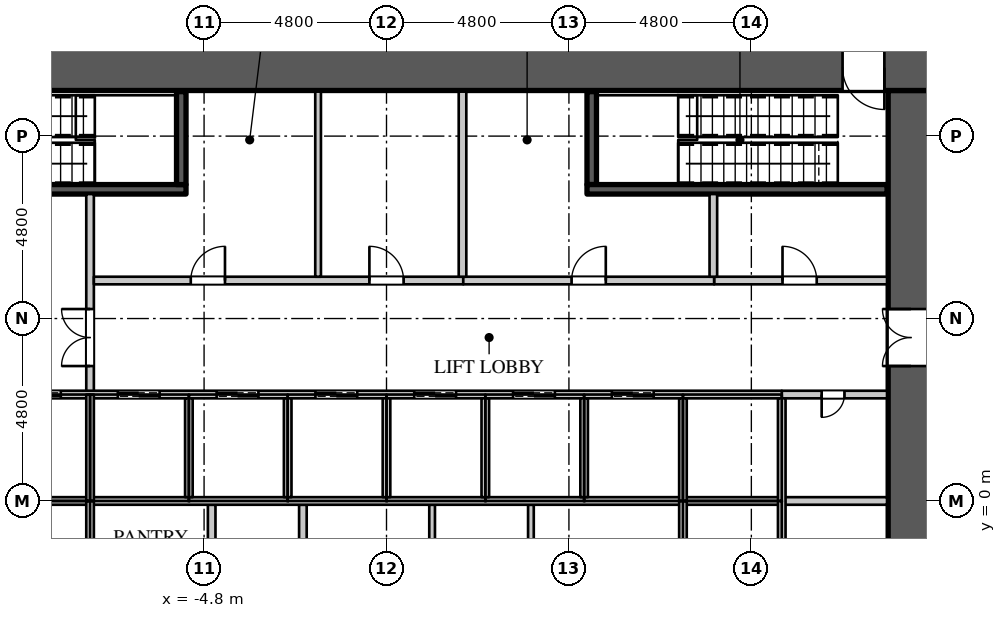
"""IFC4 building model, lengths in metres.
Left out: names, types, materials, properties, quantities, classifications, styles, units other than length and angle.
Written with IfcOpenShell. Run it as: python <this file> out.ifc"""

import sys

from ifc_helpers import new_model, si_unit, direction, frame, frame_2d, origin, place, context, subcontext, project, spatial, rectangle, extrude, element, fill, save


model = new_model("IFC4")
c1 = context("Model", 3, precision=1e-05, world=origin(), true_north=direction((0.0, 1.0)))
c2 = subcontext(c1, "Body", "Model", "MODEL_VIEW")
j1 = project(units=[si_unit("LENGTHUNIT", "METRE"), si_unit("PLANEANGLEUNIT", "RADIAN")], contexts=[c1])
p1 = place(None, origin())
s1 = spatial("IfcSite", under=j1, at=p1, CompositionType="ELEMENT")
p2 = place(p1, origin())
s2 = spatial("IfcBuilding", under=s1, at=p2, CompositionType="ELEMENT")
p3 = place(p2, frame((0.0, 0.0, 6.0)))
s3 = spatial("IfcBuildingStorey", under=s2, at=p3, CompositionType="ELEMENT", Elevation=6.0)
p4 = place(p3, frame((-14.4, 11.4, 0.0), z_axis=(0.0, 0.0, 1.0), x_axis=(1.0, 0.0, 0.0)))
e1 = element("IfcWall", 1, at=p4, inside=s3, PredefinedType="SHEAR", context=c2, shape_type="SweptSolid", body=[
    extrude(rectangle(XDim=28.8, YDim=1.2, at=frame_2d((14.4, 0.0))), origin(), (0.0, 0.0, 1.0), 5.0),
])
p5 = place(p4, frame((1.3, 0.0, 0.0)))
e2 = element("IfcOpeningElement", 2, at=p5, cuts=e1, PredefinedType="OPENING", context=c2, shape_type="SweptSolid", body=[
    extrude(rectangle(XDim=1.1, YDim=2.2, at=frame_2d((0.55, 1.1))), frame((0.0, 0.61, 0.0), z_axis=(0.0, -1.0, 0.0), x_axis=(1.0, 0.0, 0.0)), (0.0, 0.0, 1.0), 1.22),
])
p6 = place(p4, frame((26.4, 0.0, 0.0)))
e3 = element("IfcOpeningElement", 3, at=p6, cuts=e1, PredefinedType="OPENING", context=c2, shape_type="SweptSolid", body=[
    extrude(rectangle(XDim=1.1, YDim=2.2, at=frame_2d((0.55, 1.1))), frame((0.0, 0.61, 0.0), z_axis=(0.0, -1.0, 0.0), x_axis=(1.0, 0.0, 0.0)), (0.0, 0.0, 1.0), 1.22),
])
p7 = place(p3, frame((13.8, -10.8, 0.0), z_axis=(0.0, 0.0, 1.0), x_axis=(0.0, 1.0, 0.0)))
e4 = element("IfcWall", 4, at=p7, inside=s3, PredefinedType="SHEAR", context=c2, shape_type="SweptSolid", body=[
    extrude(rectangle(XDim=21.6, YDim=1.2, at=frame_2d((10.8, 0.0))), origin(), (0.0, 0.0, 1.0), 5.0),
])
p8 = place(p7, frame((14.35, 0.0, 0.0)))
e5 = element("IfcOpeningElement", 5, at=p8, cuts=e4, PredefinedType="OPENING", context=c2, shape_type="SweptSolid", body=[
    extrude(rectangle(XDim=1.5, YDim=2.4, at=frame_2d((0.75, 1.2))), frame((0.0, 0.61, 0.0), z_axis=(0.0, -1.0, 0.0), x_axis=(1.0, 0.0, 0.0)), (0.0, 0.0, 1.0), 1.22),
])
p9 = place(p7, frame((5.75, 0.0, 0.0)))
e6 = element("IfcOpeningElement", 6, at=p9, cuts=e4, PredefinedType="OPENING", context=c2, shape_type="SweptSolid", body=[
    extrude(rectangle(XDim=1.5, YDim=2.4, at=frame_2d((0.75, 1.2))), frame((0.0, 0.61, 0.0), z_axis=(0.0, -1.0, 0.0), x_axis=(1.0, 0.0, 0.0)), (0.0, 0.0, 1.0), 1.22),
])
p10 = place(p3, frame((-7.8, 2.8, 0.0), z_axis=(0.0, 0.0, 1.0), x_axis=(0.0, 1.0, 0.0)))
e7 = element("IfcWall", 7, at=p10, inside=s3, PredefinedType="PARTITIONING", context=c2, shape_type="SweptSolid", body=[
    extrude(rectangle(XDim=5.275, YDim=0.2, at=frame_2d((2.637, 0.0))), origin(), (0.0, 0.0, 1.0), 4.4),
])
p11 = place(p10, frame((0.75, 0.0, 0.0)))
e8 = element("IfcOpeningElement", 8, at=p11, cuts=e7, PredefinedType="OPENING", context=c2, shape_type="SweptSolid", body=[
    extrude(rectangle(XDim=1.5, YDim=2.4, at=frame_2d((0.75, 1.2))), frame((0.0, 0.11, 0.0), z_axis=(0.0, -1.0, 0.0), x_axis=(1.0, 0.0, 0.0)), (0.0, 0.0, 1.0), 0.22),
])
p12 = place(p3, frame((-7.7, 5.8, 0.0), z_axis=(0.0, 0.0, 1.0), x_axis=(1.0, 0.0, 0.0)))
e9 = element("IfcWall", 9, at=p12, inside=s3, PredefinedType="PARTITIONING", context=c2, shape_type="SweptSolid", body=[
    extrude(rectangle(XDim=9.72, YDim=0.2, at=frame_2d((4.86, 0.0))), origin(), (0.0, 0.0, 1.0), 4.4),
])
p13 = place(p12, frame((2.55, 0.0, 0.0)))
e10 = element("IfcOpeningElement", 10, at=p13, cuts=e9, PredefinedType="OPENING", context=c2, shape_type="SweptSolid", body=[
    extrude(rectangle(XDim=0.9, YDim=2.2, at=frame_2d((0.45, 1.1))), frame((0.0, 0.11, 0.0), z_axis=(0.0, -1.0, 0.0), x_axis=(1.0, 0.0, 0.0)), (0.0, 0.0, 1.0), 0.22),
])
p14 = place(p12, frame((7.25, 0.0, 0.0)))
e11 = element("IfcOpeningElement", 11, at=p14, cuts=e9, PredefinedType="OPENING", context=c2, shape_type="SweptSolid", body=[
    extrude(rectangle(XDim=0.9, YDim=2.2, at=frame_2d((0.45, 1.1))), frame((0.0, 0.11, 0.0), z_axis=(0.0, -1.0, 0.0), x_axis=(1.0, 0.0, 0.0)), (0.0, 0.0, 1.0), 0.22),
])
p15 = place(p3, frame((8.62, 5.8, 0.0), z_axis=(0.0, 0.0, 1.0), x_axis=(1.0, 0.0, 0.0)))
e12 = element("IfcWall", 12, at=p15, inside=s3, PredefinedType="PARTITIONING", context=c2, shape_type="SweptSolid", body=[
    extrude(rectangle(XDim=4.55, YDim=0.2, at=frame_2d((2.275, 0.0))), origin(), (0.0, 0.0, 1.0), 4.4),
])
p16 = place(p15, frame((1.8, 0.0, 0.0)))
e13 = element("IfcOpeningElement", 13, at=p16, cuts=e12, PredefinedType="OPENING", context=c2, shape_type="SweptSolid", body=[
    extrude(rectangle(XDim=0.9, YDim=2.2, at=frame_2d((0.45, 1.1))), frame((0.0, 0.11, 0.0), z_axis=(0.0, -1.0, 0.0), x_axis=(1.0, 0.0, 0.0)), (0.0, 0.0, 1.0), 0.22),
])
p17 = place(p3, frame((-1.8, 5.9, 0.0), z_axis=(0.0, 0.0, 1.0), x_axis=(0.0, 1.0, 0.0)))
e14 = element("IfcWall", 14, at=p17, inside=s3, PredefinedType="PARTITIONING", context=c2, shape_type="SweptSolid", body=[
    extrude(rectangle(XDim=4.87, YDim=0.15, at=frame_2d((2.435, 0.0))), origin(), (0.0, 0.0, 1.0), 4.4),
])
for number, where, z_axis, x_axis in (
    (15, (1.2, -2.7, 0.0), (0.0, 0.0, 1.0), (0.0, 1.0, 0.0)),
    (16, (3.8, -2.7, 0.0), (0.0, 0.0, 1.0), (0.0, 1.0, 0.0)),
):
    element("IfcWall", number, at=place(p3, frame(where, z_axis=z_axis, x_axis=x_axis)), inside=s3, PredefinedType="PARTITIONING", context=c2, shape_type="SweptSolid", body=[
        extrude(rectangle(XDim=2.6, YDim=0.15, at=frame_2d((1.3, 0.0))), origin(), (0.0, 0.0, 1.0), 4.4),
    ])
for number, where, z_axis, x_axis in (
    (17, (-4.6, -2.7, 0.0), (0.0, 0.0, 1.0), (0.0, 1.0, 0.0)),
    (18, (-2.2, -2.7, 0.0), (0.0, 0.0, 1.0), (0.0, 1.0, 0.0)),
):
    element("IfcWall", number, at=place(p3, frame(where, z_axis=z_axis, x_axis=x_axis)), inside=s3, PredefinedType="PARTITIONING", context=c2, shape_type="SweptSolid", body=[
        extrude(rectangle(XDim=2.6, YDim=0.2, at=frame_2d((1.3, 0.0))), origin(), (0.0, 0.0, 1.0), 4.4),
    ])
p18 = place(p3, frame((2.02, 5.8, 0.0), z_axis=(0.0, 0.0, 1.0), x_axis=(1.0, 0.0, 0.0)))
e19 = element("IfcWall", 19, at=p18, inside=s3, PredefinedType="PARTITIONING", context=c2, shape_type="SweptSolid", body=[
    extrude(rectangle(XDim=6.6, YDim=0.2, at=frame_2d((3.3, 0.0))), origin(), (0.0, 0.0, 1.0), 4.4),
])
p19 = place(p18, frame((2.85, 0.0, 0.0)))
e20 = element("IfcOpeningElement", 20, at=p19, cuts=e19, PredefinedType="OPENING", context=c2, shape_type="SweptSolid", body=[
    extrude(rectangle(XDim=0.9, YDim=2.2, at=frame_2d((0.45, 1.1))), frame((0.0, 0.11, 0.0), z_axis=(0.0, -1.0, 0.0), x_axis=(1.0, 0.0, 0.0)), (0.0, 0.0, 1.0), 0.22),
])
p20 = place(p3, frame((2.0, 5.9, 0.0), z_axis=(0.0, 0.0, 1.0), x_axis=(0.0, 1.0, 0.0)))
e21 = element("IfcWall", 21, at=p20, inside=s3, PredefinedType="PARTITIONING", context=c2, shape_type="SweptSolid", body=[
    extrude(rectangle(XDim=4.87, YDim=0.2, at=frame_2d((2.435, 0.0))), origin(), (0.0, 0.0, 1.0), 4.4),
])
p21 = place(p3, frame((8.6, 5.9, 0.0), z_axis=(0.0, 0.0, 1.0), x_axis=(0.0, 1.0, 0.0)))
e22 = element("IfcWall", 22, at=p21, inside=s3, PredefinedType="PARTITIONING", context=c2, shape_type="SweptSolid", body=[
    extrude(rectangle(XDim=2.175, YDim=0.2, at=frame_2d((1.087, 0.0))), origin(), (0.0, 0.0, 1.0), 4.4),
])
p22 = place(p3, frame((10.4, 2.8, 0.0), z_axis=(0.0, 0.0, 1.0), x_axis=(1.0, 0.0, 0.0)))
e23 = element("IfcWall", 23, at=p22, inside=s3, PredefinedType="PARTITIONING", context=c2, shape_type="SweptSolid", body=[
    extrude(rectangle(XDim=2.77, YDim=0.2, at=frame_2d((1.385, 0.0))), origin(), (0.0, 0.0, 1.0), 4.4),
])
p23 = place(p22, frame((1.05, 0.0, 0.0)))
e24 = element("IfcOpeningElement", 24, at=p23, cuts=e23, PredefinedType="OPENING", context=c2, shape_type="SweptSolid", body=[
    extrude(rectangle(XDim=0.6, YDim=2.0, at=frame_2d((0.3, 1.0))), frame((0.0, 0.11, 0.0), z_axis=(0.0, -1.0, 0.0), x_axis=(1.0, 0.0, 0.0)), (0.0, 0.0, 1.0), 0.22),
])
p24 = place(p3, frame((10.4, 0.0, 0.0), z_axis=(0.0, 0.0, 1.0), x_axis=(1.0, 0.0, 0.0)))
e25 = element("IfcWall", 25, at=p24, inside=s3, PredefinedType="PARTITIONING", context=c2, shape_type="SweptSolid", body=[
    extrude(rectangle(XDim=2.77, YDim=0.2, at=frame_2d((1.385, 0.0))), origin(), (0.0, 0.0, 1.0), 4.4),
])
p25 = place(p3, frame((-13.17, 0.0, 0.0), z_axis=(0.0, 0.0, 1.0), x_axis=(1.0, 0.0, 0.0)))
e26 = element("IfcWall", 26, at=p25, inside=s3, PredefinedType="PARTITIONING", context=c2, shape_type="SweptSolid", body=[
    extrude(rectangle(XDim=23.57, YDim=0.2, at=frame_2d((11.785, 0.0))), origin(), (0.0, 0.0, 1.0), 4.4),
])
p26 = place(p3, frame((-13.17, 2.8, 0.0), z_axis=(0.0, 0.0, 1.0), x_axis=(1.0, 0.0, 0.0)))
e27 = element("IfcWall", 27, at=p26, inside=s3, PredefinedType="PARTITIONING", context=c2, shape_type="SweptSolid", body=[
    extrude(rectangle(XDim=23.57, YDim=0.2, at=frame_2d((11.785, 0.0))), origin(), (0.0, 0.0, 1.0), 4.4),
])
p27 = place(p26, frame((0.8, 0.0, 0.0)))
e28 = element("IfcOpeningElement", 28, at=p27, cuts=e27, PredefinedType="OPENING", context=c2, shape_type="SweptSolid", body=[
    extrude(rectangle(XDim=1.1, YDim=2.2, at=frame_2d((0.55, 1.1))), frame((0.0, 0.11, 0.0), z_axis=(0.0, -1.0, 0.0), x_axis=(1.0, 0.0, 0.0)), (0.0, 0.0, 1.0), 0.22),
])
p28 = place(p26, frame((3.5, 0.0, 0.0)))
e29 = element("IfcOpeningElement", 29, at=p28, cuts=e27, PredefinedType="OPENING", context=c2, shape_type="SweptSolid", body=[
    extrude(rectangle(XDim=1.1, YDim=2.2, at=frame_2d((0.55, 1.1))), frame((0.0, 0.11, 0.0), z_axis=(0.0, -1.0, 0.0), x_axis=(1.0, 0.0, 0.0)), (0.0, 0.0, 1.0), 0.22),
])
p29 = place(p26, frame((6.1, 0.0, 0.0)))
e30 = element("IfcOpeningElement", 30, at=p29, cuts=e27, PredefinedType="OPENING", context=c2, shape_type="SweptSolid", body=[
    extrude(rectangle(XDim=1.1, YDim=2.2, at=frame_2d((0.55, 1.1))), frame((0.0, 0.11, 0.0), z_axis=(0.0, -1.0, 0.0), x_axis=(1.0, 0.0, 0.0)), (0.0, 0.0, 1.0), 0.22),
])
p30 = place(p26, frame((8.7, 0.0, 0.0)))
e31 = element("IfcOpeningElement", 31, at=p30, cuts=e27, PredefinedType="OPENING", context=c2, shape_type="SweptSolid", body=[
    extrude(rectangle(XDim=1.1, YDim=2.2, at=frame_2d((0.55, 1.1))), frame((0.0, 0.11, 0.0), z_axis=(0.0, -1.0, 0.0), x_axis=(1.0, 0.0, 0.0)), (0.0, 0.0, 1.0), 0.22),
])
p31 = place(p26, frame((11.3, 0.0, 0.0)))
e32 = element("IfcOpeningElement", 32, at=p31, cuts=e27, PredefinedType="OPENING", context=c2, shape_type="SweptSolid", body=[
    extrude(rectangle(XDim=1.1, YDim=2.2, at=frame_2d((0.55, 1.1))), frame((0.0, 0.11, 0.0), z_axis=(0.0, -1.0, 0.0), x_axis=(1.0, 0.0, 0.0)), (0.0, 0.0, 1.0), 0.22),
])
p32 = place(p26, frame((13.9, 0.0, 0.0)))
e33 = element("IfcOpeningElement", 33, at=p32, cuts=e27, PredefinedType="OPENING", context=c2, shape_type="SweptSolid", body=[
    extrude(rectangle(XDim=1.1, YDim=2.2, at=frame_2d((0.55, 1.1))), frame((0.0, 0.11, 0.0), z_axis=(0.0, -1.0, 0.0), x_axis=(1.0, 0.0, 0.0)), (0.0, 0.0, 1.0), 0.22),
])
p33 = place(p26, frame((16.5, 0.0, 0.0)))
e34 = element("IfcOpeningElement", 34, at=p33, cuts=e27, PredefinedType="OPENING", context=c2, shape_type="SweptSolid", body=[
    extrude(rectangle(XDim=1.1, YDim=2.2, at=frame_2d((0.55, 1.1))), frame((0.0, 0.11, 0.0), z_axis=(0.0, -1.0, 0.0), x_axis=(1.0, 0.0, 0.0)), (0.0, 0.0, 1.0), 0.22),
])
p34 = place(p26, frame((19.1, 0.0, 0.0)))
e35 = element("IfcOpeningElement", 35, at=p34, cuts=e27, PredefinedType="OPENING", context=c2, shape_type="SweptSolid", body=[
    extrude(rectangle(XDim=1.1, YDim=2.2, at=frame_2d((0.55, 1.1))), frame((0.0, 0.11, 0.0), z_axis=(0.0, -1.0, 0.0), x_axis=(1.0, 0.0, 0.0)), (0.0, 0.0, 1.0), 0.22),
])
for number, where, z_axis, x_axis in (
    (36, (-7.8, -2.8, 0.0), (0.0, 0.0, 1.0), (0.0, 1.0, 0.0)),
    (37, (-7.8, 0.0, 0.0), (0.0, 0.0, 1.0), (0.0, 1.0, 0.0)),
):
    element("IfcWall", number, at=place(p3, frame(where, z_axis=z_axis, x_axis=x_axis)), inside=s3, PredefinedType="PARTITIONING", context=c2, shape_type="SweptSolid", body=[
        extrude(rectangle(XDim=2.8, YDim=0.2, at=frame_2d((1.4, 0.0))), origin(), (0.0, 0.0, 1.0), 4.4),
    ])
for number, where, z_axis, x_axis in (
    (38, (-5.2, 0.1, 0.0), (0.0, 0.0, 1.0), (0.0, 1.0, 0.0)),
    (39, (-2.6, 0.1, 0.0), (0.0, 0.0, 1.0), (0.0, 1.0, 0.0)),
    (40, (0.0, 0.1, 0.0), (0.0, 0.0, 1.0), (0.0, 1.0, 0.0)),
    (41, (2.6, 0.1, 0.0), (0.0, 0.0, 1.0), (0.0, 1.0, 0.0)),
    (42, (5.2, 0.1, 0.0), (0.0, 0.0, 1.0), (0.0, 1.0, 0.0)),
):
    element("IfcWall", number, at=place(p3, frame(where, z_axis=z_axis, x_axis=x_axis)), inside=s3, PredefinedType="PARTITIONING", context=c2, shape_type="SweptSolid", body=[
        extrude(rectangle(XDim=2.6, YDim=0.2, at=frame_2d((1.3, 0.0))), origin(), (0.0, 0.0, 1.0), 4.4),
    ])
for number, where, z_axis, x_axis in (
    (43, (7.8, -2.7, 0.0), (0.0, 0.0, 1.0), (0.0, 1.0, 0.0)),
    (44, (7.8, 0.0, 0.0), (0.0, 0.0, 1.0), (0.0, 1.0, 0.0)),
):
    element("IfcWall", number, at=place(p3, frame(where, z_axis=z_axis, x_axis=x_axis)), inside=s3, PredefinedType="PARTITIONING", context=c2, shape_type="SweptSolid", body=[
        extrude(rectangle(XDim=2.7, YDim=0.2, at=frame_2d((1.35, 0.0))), origin(), (0.0, 0.0, 1.0), 4.4),
    ])
p35 = place(p3, frame((10.4, -2.7, 0.0), z_axis=(0.0, 0.0, 1.0), x_axis=(0.0, 1.0, 0.0)))
e45 = element("IfcWall", 45, at=p35, inside=s3, PredefinedType="PARTITIONING", context=c2, shape_type="SweptSolid", body=[
    extrude(rectangle(XDim=5.4, YDim=0.2, at=frame_2d((2.7, 0.0))), origin(), (0.0, 0.0, 1.0), 4.4),
])
p36 = place(p3, frame((-13.17, 8.2, 0.0), z_axis=(0.0, 0.0, 1.0), x_axis=(1.0, 0.0, 0.0)))
e46 = element("IfcWall", 46, at=p36, inside=s3, PredefinedType="SHEAR", context=c2, shape_type="SweptSolid", body=[
    extrude(rectangle(XDim=7.895, YDim=0.25, at=frame_2d((3.948, 0.0))), origin(), (0.0, 0.0, 1.0), 4.65),
])
p37 = place(p36, frame((0.15, 0.0, 0.0)))
e47 = element("IfcOpeningElement", 47, at=p37, cuts=e46, PredefinedType="OPENING", context=c2, shape_type="SweptSolid", body=[
    extrude(rectangle(XDim=1.1, YDim=2.2, at=frame_2d((0.55, 1.1))), frame((0.0, 0.135, 0.0), z_axis=(0.0, -1.0, 0.0), x_axis=(1.0, 0.0, 0.0)), (0.0, 0.0, 1.0), 0.27),
])
for number, where, z_axis, x_axis in (
    (48, (-5.4, 8.325, 0.0), (0.0, 0.0, 1.0), (0.0, 1.0, 0.0)),
    (49, (5.4, 8.325, 0.0), (0.0, 0.0, 1.0), (0.0, 1.0, 0.0)),
):
    element("IfcWall", number, at=place(p3, frame(where, z_axis=z_axis, x_axis=x_axis)), inside=s3, PredefinedType="SHEAR", context=c2, shape_type="SweptSolid", body=[
        extrude(rectangle(XDim=2.445, YDim=0.25, at=frame_2d((1.223, 0.0))), origin(), (0.0, 0.0, 1.0), 4.65),
    ])
p38 = place(p3, frame((5.275, 8.2, 0.0), z_axis=(0.0, 0.0, 1.0), x_axis=(1.0, 0.0, 0.0)))
e50 = element("IfcWall", 50, at=p38, inside=s3, PredefinedType="SHEAR", context=c2, shape_type="SweptSolid", body=[
    extrude(rectangle(XDim=7.895, YDim=0.25, at=frame_2d((3.948, 0.0))), origin(), (0.0, 0.0, 1.0), 4.65),
])
p39 = place(p23, origin())
e51 = element("IfcDoor", 51, at=p39, inside=s3, OperationType="SINGLE_SWING_RIGHT", PredefinedType="DOOR", context=c2, shape_type="SweptSolid", body=[
    extrude(rectangle(XDim=0.6, YDim=2.0, at=frame_2d((0.3, 1.0))), frame((0.0, 0.025, 0.0), z_axis=(0.0, -1.0, 0.0), x_axis=(1.0, 0.0, 0.0)), (0.0, 0.0, 1.0), 0.05),
])
fill(e24, e51)
p40 = place(p13, origin())
e52 = element("IfcDoor", 52, at=p40, inside=s3, OperationType="SINGLE_SWING_RIGHT", PredefinedType="DOOR", context=c2, shape_type="SweptSolid", body=[
    extrude(rectangle(XDim=0.9, YDim=2.2, at=frame_2d((0.45, 1.1))), frame((0.0, 0.025, 0.0), z_axis=(0.0, -1.0, 0.0), x_axis=(1.0, 0.0, 0.0)), (0.0, 0.0, 1.0), 0.05),
])
fill(e10, e52)
p41 = place(p14, origin())
e53 = element("IfcDoor", 53, at=p41, inside=s3, OperationType="SINGLE_SWING_LEFT", PredefinedType="DOOR", context=c2, shape_type="SweptSolid", body=[
    extrude(rectangle(XDim=0.9, YDim=2.2, at=frame_2d((0.45, 1.1))), frame((0.0, 0.025, 0.0), z_axis=(0.0, -1.0, 0.0), x_axis=(1.0, 0.0, 0.0)), (0.0, 0.0, 1.0), 0.05),
])
fill(e11, e53)
p42 = place(p19, origin())
e54 = element("IfcDoor", 54, at=p42, inside=s3, OperationType="SINGLE_SWING_RIGHT", PredefinedType="DOOR", context=c2, shape_type="SweptSolid", body=[
    extrude(rectangle(XDim=0.9, YDim=2.2, at=frame_2d((0.45, 1.1))), frame((0.0, 0.025, 0.0), z_axis=(0.0, -1.0, 0.0), x_axis=(1.0, 0.0, 0.0)), (0.0, 0.0, 1.0), 0.05),
])
fill(e20, e54)
p43 = place(p16, origin())
e55 = element("IfcDoor", 55, at=p43, inside=s3, OperationType="SINGLE_SWING_LEFT", PredefinedType="DOOR", context=c2, shape_type="SweptSolid", body=[
    extrude(rectangle(XDim=0.9, YDim=2.2, at=frame_2d((0.45, 1.1))), frame((0.0, 0.025, 0.0), z_axis=(0.0, -1.0, 0.0), x_axis=(1.0, 0.0, 0.0)), (0.0, 0.0, 1.0), 0.05),
])
fill(e13, e55)
p44 = place(p28, origin())
e56 = element("IfcDoor", 56, at=p44, inside=s3, OperationType="DOUBLE_DOOR_SLIDING", PredefinedType="DOOR", context=c2, shape_type="SweptSolid", body=[
    extrude(rectangle(XDim=1.1, YDim=2.2, at=frame_2d((0.55, 1.1))), frame((0.0, 0.025, 0.0), z_axis=(0.0, -1.0, 0.0), x_axis=(1.0, 0.0, 0.0)), (0.0, 0.0, 1.0), 0.05),
])
fill(e29, e56)
p45 = place(p29, origin())
e57 = element("IfcDoor", 57, at=p45, inside=s3, OperationType="DOUBLE_DOOR_SLIDING", PredefinedType="DOOR", context=c2, shape_type="SweptSolid", body=[
    extrude(rectangle(XDim=1.1, YDim=2.2, at=frame_2d((0.55, 1.1))), frame((0.0, 0.025, 0.0), z_axis=(0.0, -1.0, 0.0), x_axis=(1.0, 0.0, 0.0)), (0.0, 0.0, 1.0), 0.05),
])
fill(e30, e57)
p46 = place(p30, origin())
e58 = element("IfcDoor", 58, at=p46, inside=s3, OperationType="DOUBLE_DOOR_SLIDING", PredefinedType="DOOR", context=c2, shape_type="SweptSolid", body=[
    extrude(rectangle(XDim=1.1, YDim=2.2, at=frame_2d((0.55, 1.1))), frame((0.0, 0.025, 0.0), z_axis=(0.0, -1.0, 0.0), x_axis=(1.0, 0.0, 0.0)), (0.0, 0.0, 1.0), 0.05),
])
fill(e31, e58)
p47 = place(p31, origin())
e59 = element("IfcDoor", 59, at=p47, inside=s3, OperationType="DOUBLE_DOOR_SLIDING", PredefinedType="DOOR", context=c2, shape_type="SweptSolid", body=[
    extrude(rectangle(XDim=1.1, YDim=2.2, at=frame_2d((0.55, 1.1))), frame((0.0, 0.025, 0.0), z_axis=(0.0, -1.0, 0.0), x_axis=(1.0, 0.0, 0.0)), (0.0, 0.0, 1.0), 0.05),
])
fill(e32, e59)
p48 = place(p32, origin())
e60 = element("IfcDoor", 60, at=p48, inside=s3, OperationType="DOUBLE_DOOR_SLIDING", PredefinedType="DOOR", context=c2, shape_type="SweptSolid", body=[
    extrude(rectangle(XDim=1.1, YDim=2.2, at=frame_2d((0.55, 1.1))), frame((0.0, 0.025, 0.0), z_axis=(0.0, -1.0, 0.0), x_axis=(1.0, 0.0, 0.0)), (0.0, 0.0, 1.0), 0.05),
])
fill(e33, e60)
p49 = place(p33, origin())
e61 = element("IfcDoor", 61, at=p49, inside=s3, OperationType="DOUBLE_DOOR_SLIDING", PredefinedType="DOOR", context=c2, shape_type="SweptSolid", body=[
    extrude(rectangle(XDim=1.1, YDim=2.2, at=frame_2d((0.55, 1.1))), frame((0.0, 0.025, 0.0), z_axis=(0.0, -1.0, 0.0), x_axis=(1.0, 0.0, 0.0)), (0.0, 0.0, 1.0), 0.05),
])
fill(e34, e61)
p50 = place(p34, origin())
e62 = element("IfcDoor", 62, at=p50, inside=s3, OperationType="DOUBLE_DOOR_SLIDING", PredefinedType="DOOR", context=c2, shape_type="SweptSolid", body=[
    extrude(rectangle(XDim=1.1, YDim=2.2, at=frame_2d((0.55, 1.1))), frame((0.0, 0.025, 0.0), z_axis=(0.0, -1.0, 0.0), x_axis=(1.0, 0.0, 0.0)), (0.0, 0.0, 1.0), 0.05),
])
fill(e35, e62)
p51 = place(p11, origin())
e63 = element("IfcDoor", 63, at=p51, inside=s3, OperationType="DOUBLE_DOOR_SINGLE_SWING", PredefinedType="DOOR", context=c2, shape_type="SweptSolid", body=[
    extrude(rectangle(XDim=1.5, YDim=2.4, at=frame_2d((0.75, 1.2))), frame((0.0, 0.025, 0.0), z_axis=(0.0, -1.0, 0.0), x_axis=(1.0, 0.0, 0.0)), (0.0, 0.0, 1.0), 0.05),
])
fill(e8, e63)
p52 = place(p8, origin())
e64 = element("IfcDoor", 64, at=p52, inside=s3, OperationType="DOUBLE_DOOR_SINGLE_SWING", PredefinedType="DOOR", context=c2, shape_type="SweptSolid", body=[
    extrude(rectangle(XDim=1.5, YDim=2.4, at=frame_2d((0.75, 1.2))), frame((0.0, 0.025, 0.0), z_axis=(0.0, -1.0, 0.0), x_axis=(1.0, 0.0, 0.0)), (0.0, 0.0, 1.0), 0.05),
])
fill(e5, e64)
p53 = place(p6, origin())
e65 = element("IfcDoor", 65, at=p53, inside=s3, OperationType="SINGLE_SWING_LEFT", PredefinedType="DOOR", context=c2, shape_type="SweptSolid", body=[
    extrude(rectangle(XDim=1.1, YDim=2.2, at=frame_2d((0.55, 1.1))), frame((0.0, 0.025, 0.0), z_axis=(0.0, -1.0, 0.0), x_axis=(1.0, 0.0, 0.0)), (0.0, 0.0, 1.0), 0.05),
])
fill(e3, e65)
save(model, sys.argv[1])
